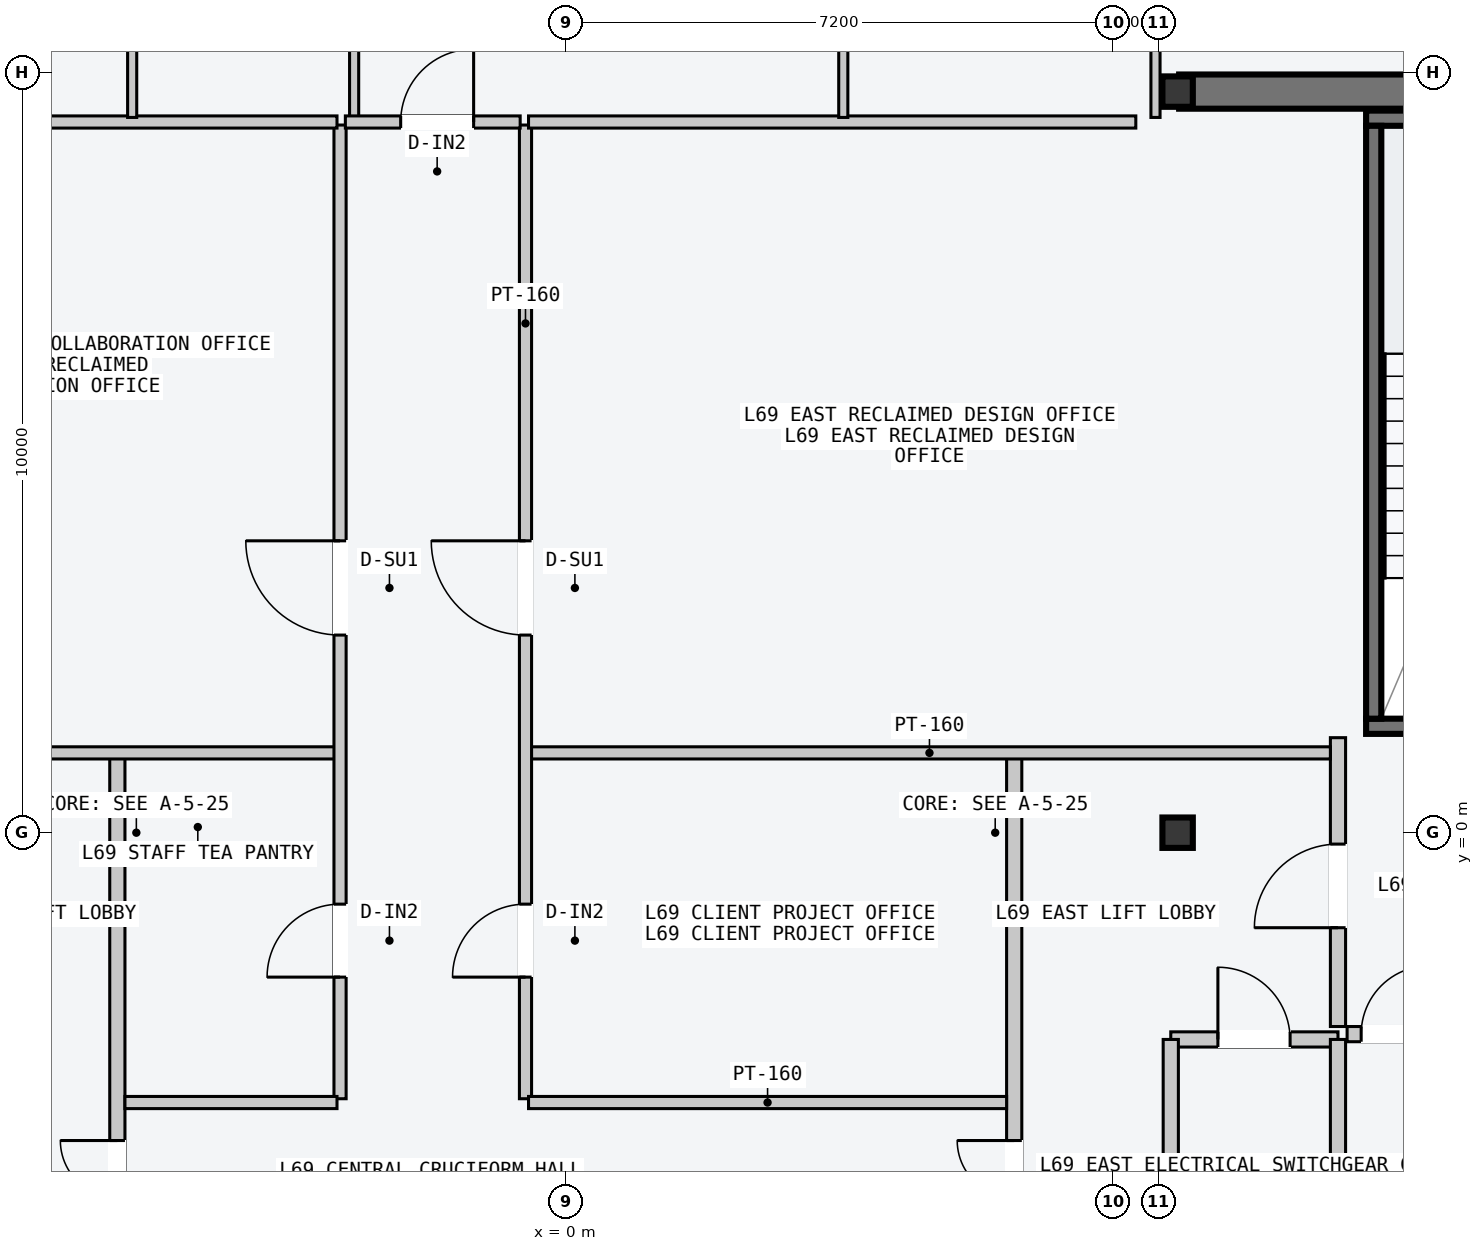
"""IFC4 building model, lengths in metres.
Left out: names, types, materials, properties, quantities, classifications, styles, units other than length and angle.
Written with IfcOpenShell. Run it as: python <this file> out.ifc"""

import sys

from ifc_helpers import new_model, si_unit, direction, frame, frame_2d, origin, origin_2d, place, context, subcontext, project, spatial, rectangle, i_section, extrude, element, fill, save


model = new_model("IFC4")
c1 = context("Model", 3, precision=1e-05, world=origin(), true_north=direction((0.0, 1.0)))
c2 = subcontext(c1, "Body", "Model", "MODEL_VIEW")
j1 = project(units=[si_unit("LENGTHUNIT", "METRE"), si_unit("PLANEANGLEUNIT", "RADIAN")], contexts=[c1])
p1 = place(None, origin())
s1 = spatial("IfcSite", under=j1, at=p1, CompositionType="ELEMENT")
p2 = place(p1, origin())
s2 = spatial("IfcBuilding", under=s1, at=p2, CompositionType="ELEMENT")
p3 = place(p2, frame((0.0, 0.0, 261.6)))
s3 = spatial("IfcBuildingStorey", under=s2, at=p3, CompositionType="ELEMENT", Elevation=261.6)
p4 = place(p3, frame((8.07, 9.75, -0.2), z_axis=(0.0, 0.0, 1.0), x_axis=(1.0, 0.0, 0.0)))
e1 = element("IfcWall", 1, at=p4, inside=s3, PredefinedType="SHEAR", context=c2, shape_type="SweptSolid", body=[
    extrude(rectangle(XDim=6.46, YDim=0.45, at=frame_2d((3.23, 0.0))), origin(), (0.0, 0.0, 1.0), 3.6),
])
p5 = place(p3, frame((10.53, 1.4, -0.2), z_axis=(0.0, 0.0, 1.0), x_axis=(1.0, 0.0, 0.0)))
e2 = element("IfcWall", 2, at=p5, inside=s3, PredefinedType="SOLIDWALL", context=c2, shape_type="SweptSolid", body=[
    extrude(rectangle(XDim=3.72, YDim=0.2, at=frame_2d((1.86, 0.0))), origin(), (0.0, 0.0, 1.0), 3.6),
])
p6 = place(p5, frame((1.5, 0.0, 0.2)))
e3 = element("IfcOpeningElement", 3, at=p6, cuts=e2, PredefinedType="OPENING", context=c2, shape_type="SweptSolid", body=[
    extrude(rectangle(XDim=1.12, YDim=2.18, at=frame_2d((0.56, 1.09))), frame((0.0, 0.11, 0.0), z_axis=(0.0, -1.0, 0.0), x_axis=(1.0, 0.0, 0.0)), (0.0, 0.0, 1.0), 0.22),
])
p7 = place(p3, frame((10.53, 9.4, -0.2), z_axis=(0.0, 0.0, 1.0), x_axis=(1.0, 0.0, 0.0)))
e4 = element("IfcWall", 4, at=p7, inside=s3, PredefinedType="SOLIDWALL", context=c2, shape_type="SweptSolid", body=[
    extrude(rectangle(XDim=3.72, YDim=0.2, at=frame_2d((1.86, 0.0))), origin(), (0.0, 0.0, 1.0), 3.6),
])
p8 = place(p3, frame((10.63, 1.5, -0.2), z_axis=(0.0, 0.0, 1.0), x_axis=(0.0, 1.0, 0.0)))
e5 = element("IfcWall", 5, at=p8, inside=s3, PredefinedType="SOLIDWALL", context=c2, shape_type="SweptSolid", body=[
    extrude(rectangle(XDim=7.8, YDim=0.2, at=frame_2d((3.9, 0.0))), origin(), (0.0, 0.0, 1.0), 3.6),
])
for number, where, z_axis, x_axis in (
    (6, (8.05, 0.0, 0.0), (0.0, 0.0, 1.0), (1.0, 0.0, 0.0)),
    (7, (8.05, 9.75, 0.0), (0.0, 0.0, 1.0), (1.0, 0.0, 0.0)),
):
    element("IfcColumn", number, at=place(p3, frame(where, z_axis=z_axis, x_axis=x_axis)), inside=s3, PredefinedType="COLUMN", context=c2, shape_type="SweptSolid", body=[
        extrude(i_section(OverallWidth=0.4, OverallDepth=0.4, WebThickness=0.013, FlangeThickness=0.021, at=origin_2d()), origin(), (0.0, 0.0, 1.0), 3.6),
    ])
p9 = place(p3, frame((-5.9, -9.45, 0.0), z_axis=(0.0, 0.0, 1.0), x_axis=(0.0, 1.0, 0.0)))
e8 = element("IfcWall", 8, at=p9, inside=s3, PredefinedType="PARTITIONING", context=c2, shape_type="SweptSolid", body=[
    extrude(rectangle(XDim=10.5, YDim=0.2, at=frame_2d((5.25, 0.0))), origin(), (0.0, 0.0, 1.0), 3.4),
])
p10 = place(p9, frame((3.9, 0.0, 0.0)))
e9 = element("IfcOpeningElement", 9, at=p10, cuts=e8, PredefinedType="OPENING", context=c2, shape_type="SweptSolid", body=[
    extrude(rectangle(XDim=1.5, YDim=2.2, at=frame_2d((0.75, 1.1))), frame((0.0, 0.11, 0.0), z_axis=(0.0, -1.0, 0.0), x_axis=(1.0, 0.0, 0.0)), (0.0, 0.0, 1.0), 0.22),
])
p11 = place(p3, frame((5.9, -9.45, 0.0), z_axis=(0.0, 0.0, 1.0), x_axis=(0.0, 1.0, 0.0)))
e10 = element("IfcWall", 10, at=p11, inside=s3, PredefinedType="PARTITIONING", context=c2, shape_type="SweptSolid", body=[
    extrude(rectangle(XDim=10.5, YDim=0.2, at=frame_2d((5.25, 0.0))), origin(), (0.0, 0.0, 1.0), 3.4),
])
p12 = place(p11, frame((3.9, 0.0, 0.0)))
e11 = element("IfcOpeningElement", 11, at=p12, cuts=e10, PredefinedType="OPENING", context=c2, shape_type="SweptSolid", body=[
    extrude(rectangle(XDim=1.5, YDim=2.2, at=frame_2d((0.75, 1.1))), frame((0.0, 0.11, 0.0), z_axis=(0.0, -1.0, 0.0), x_axis=(1.0, 0.0, 0.0)), (0.0, 0.0, 1.0), 0.22),
])
p13 = place(p3, frame((10.16, -2.55, 0.0), z_axis=(0.0, 0.0, 1.0), x_axis=(0.0, 1.0, 0.0)))
e12 = element("IfcWall", 12, at=p13, inside=s3, PredefinedType="PARTITIONING", context=c2, shape_type="SweptSolid", body=[
    extrude(rectangle(XDim=3.8, YDim=0.2, at=frame_2d((1.9, 0.0))), origin(), (0.0, 0.0, 1.0), 3.4),
])
p14 = place(p13, frame((1.3, 0.0, 0.0)))
e13 = element("IfcOpeningElement", 13, at=p14, cuts=e12, PredefinedType="OPENING", context=c2, shape_type="SweptSolid", body=[
    extrude(rectangle(XDim=1.1, YDim=2.15, at=frame_2d((0.55, 1.075))), frame((0.0, 0.11, 0.0), z_axis=(0.0, -1.0, 0.0), x_axis=(1.0, 0.0, 0.0)), (0.0, 0.0, 1.0), 0.22),
])
p15 = place(p3, frame((10.28, -2.65, 0.0), z_axis=(0.0, 0.0, 1.0), x_axis=(1.0, 0.0, 0.0)))
e14 = element("IfcWall", 14, at=p15, inside=s3, PredefinedType="PARTITIONING", context=c2, shape_type="SweptSolid", body=[
    extrude(rectangle(XDim=1.27, YDim=0.2, at=frame_2d((0.635, 0.0))), origin(), (0.0, 0.0, 1.0), 3.4),
])
p16 = place(p15, frame((0.185, 0.0, 0.0)))
e15 = element("IfcOpeningElement", 15, at=p16, cuts=e14, PredefinedType="OPENING", context=c2, shape_type="SweptSolid", body=[
    extrude(rectangle(XDim=0.9, YDim=2.15, at=frame_2d((0.45, 1.075))), frame((0.0, 0.11, 0.0), z_axis=(0.0, -1.0, 0.0), x_axis=(1.0, 0.0, 0.0)), (0.0, 0.0, 1.0), 0.22),
])
p17 = place(p3, frame((7.96, -2.72, 0.0), z_axis=(0.0, 0.0, 1.0), x_axis=(1.0, 0.0, 0.0)))
e16 = element("IfcWall", 16, at=p17, inside=s3, PredefinedType="PARTITIONING", context=c2, shape_type="SweptSolid", body=[
    extrude(rectangle(XDim=2.2, YDim=0.2, at=frame_2d((1.1, 0.0))), origin(), (0.0, 0.0, 1.0), 3.4),
])
p18 = place(p17, frame((0.62, 0.0, 0.0)))
e17 = element("IfcOpeningElement", 17, at=p18, cuts=e16, PredefinedType="OPENING", context=c2, shape_type="SweptSolid", body=[
    extrude(rectangle(XDim=0.95, YDim=2.1, at=frame_2d((0.475, 1.05))), frame((0.0, 0.11, 0.0), z_axis=(0.0, -1.0, 0.0), x_axis=(1.0, 0.0, 0.0)), (0.0, 0.0, 1.0), 0.22),
])
for number, where, z_axis, x_axis in (
    (18, (7.96, -5.16, 0.0), (0.0, 0.0, 1.0), (0.0, 1.0, 0.0)),
    (19, (10.16, -5.16, 0.0), (0.0, 0.0, 1.0), (0.0, 1.0, 0.0)),
):
    element("IfcWall", number, at=place(p3, frame(where, z_axis=z_axis, x_axis=x_axis)), inside=s3, PredefinedType="PARTITIONING", context=c2, shape_type="SweptSolid", body=[
        extrude(rectangle(XDim=2.44, YDim=0.2, at=frame_2d((1.22, 0.0))), origin(), (0.0, 0.0, 1.0), 3.4),
    ])
p19 = place(p3, frame((-10.05, 1.05, 0.0), z_axis=(0.0, 0.0, 1.0), x_axis=(1.0, 0.0, 0.0)))
e20 = element("IfcWall", 20, at=p19, inside=s3, PredefinedType="PARTITIONING", context=c2, shape_type="SweptSolid", body=[
    extrude(rectangle(XDim=7.04, YDim=0.16, at=frame_2d((3.52, 0.0))), origin(), (0.0, 0.0, 1.0), 3.4),
])
p20 = place(p3, frame((-2.97, -3.5, 0.0), z_axis=(0.0, 0.0, 1.0), x_axis=(0.0, 1.0, 0.0)))
e21 = element("IfcWall", 21, at=p20, inside=s3, PredefinedType="PARTITIONING", context=c2, shape_type="SweptSolid", body=[
    extrude(rectangle(XDim=12.81, YDim=0.16, at=frame_2d((6.405, 0.0))), origin(), (0.0, 0.0, 1.0), 3.4),
])
p21 = place(p20, frame((6.1, 0.0, 0.0)))
e22 = element("IfcOpeningElement", 22, at=p21, cuts=e21, PredefinedType="OPENING", context=c2, shape_type="SweptSolid", body=[
    extrude(rectangle(XDim=1.24, YDim=2.24, at=frame_2d((0.62, 1.12))), frame((0.0, 0.09, 0.0), z_axis=(0.0, -1.0, 0.0), x_axis=(1.0, 0.0, 0.0)), (0.0, 0.0, 1.0), 0.18),
])
p22 = place(p20, frame((1.6, 0.0, 0.0)))
e23 = element("IfcOpeningElement", 23, at=p22, cuts=e21, PredefinedType="OPENING", context=c2, shape_type="SweptSolid", body=[
    extrude(rectangle(XDim=0.96, YDim=2.18, at=frame_2d((0.48, 1.09))), frame((0.0, 0.09, 0.0), z_axis=(0.0, -1.0, 0.0), x_axis=(1.0, 0.0, 0.0)), (0.0, 0.0, 1.0), 0.18),
])
p23 = place(p3, frame((-7.5, 9.35, 0.0), z_axis=(0.0, 0.0, 1.0), x_axis=(1.0, 0.0, 0.0)))
e24 = element("IfcWall", 24, at=p23, inside=s3, PredefinedType="PARTITIONING", context=c2, shape_type="SweptSolid", body=[
    extrude(rectangle(XDim=4.49, YDim=0.16, at=frame_2d((2.245, 0.0))), origin(), (0.0, 0.0, 1.0), 3.4),
])
p24 = place(p3, frame((-5.8, -3.55, 0.0), z_axis=(0.0, 0.0, 1.0), x_axis=(1.0, 0.0, 0.0)))
e25 = element("IfcWall", 25, at=p24, inside=s3, PredefinedType="PARTITIONING", context=c2, shape_type="SweptSolid", body=[
    extrude(rectangle(XDim=2.79, YDim=0.16, at=frame_2d((1.395, 0.0))), origin(), (0.0, 0.0, 1.0), 3.4),
])
p25 = place(p3, frame((-0.49, 1.05, 0.0), z_axis=(0.0, 0.0, 1.0), x_axis=(1.0, 0.0, 0.0)))
e26 = element("IfcWall", 26, at=p25, inside=s3, PredefinedType="PARTITIONING", context=c2, shape_type="SweptSolid", body=[
    extrude(rectangle(XDim=10.55, YDim=0.16, at=frame_2d((5.275, 0.0))), origin(), (0.0, 0.0, 1.0), 3.4),
])
p26 = place(p3, frame((-0.53, -3.5, 0.0), z_axis=(0.0, 0.0, 1.0), x_axis=(0.0, 1.0, 0.0)))
e27 = element("IfcWall", 27, at=p26, inside=s3, PredefinedType="PARTITIONING", context=c2, shape_type="SweptSolid", body=[
    extrude(rectangle(XDim=12.81, YDim=0.16, at=frame_2d((6.405, 0.0))), origin(), (0.0, 0.0, 1.0), 3.4),
])
p27 = place(p26, frame((6.1, 0.0, 0.0)))
e28 = element("IfcOpeningElement", 28, at=p27, cuts=e27, PredefinedType="OPENING", context=c2, shape_type="SweptSolid", body=[
    extrude(rectangle(XDim=1.24, YDim=2.24, at=frame_2d((0.62, 1.12))), frame((0.0, 0.09, 0.0), z_axis=(0.0, -1.0, 0.0), x_axis=(1.0, 0.0, 0.0)), (0.0, 0.0, 1.0), 0.18),
])
p28 = place(p26, frame((1.6, 0.0, 0.0)))
e29 = element("IfcOpeningElement", 29, at=p28, cuts=e27, PredefinedType="OPENING", context=c2, shape_type="SweptSolid", body=[
    extrude(rectangle(XDim=0.96, YDim=2.18, at=frame_2d((0.48, 1.09))), frame((0.0, 0.09, 0.0), z_axis=(0.0, -1.0, 0.0), x_axis=(1.0, 0.0, 0.0)), (0.0, 0.0, 1.0), 0.18),
])
p29 = place(p3, frame((-0.49, 9.35, 0.0), z_axis=(0.0, 0.0, 1.0), x_axis=(1.0, 0.0, 0.0)))
e30 = element("IfcWall", 30, at=p29, inside=s3, PredefinedType="PARTITIONING", context=c2, shape_type="SweptSolid", body=[
    extrude(rectangle(XDim=7.99, YDim=0.16, at=frame_2d((3.995, 0.0))), origin(), (0.0, 0.0, 1.0), 3.4),
])
p30 = place(p3, frame((-0.49, -3.55, 0.0), z_axis=(0.0, 0.0, 1.0), x_axis=(1.0, 0.0, 0.0)))
e31 = element("IfcWall", 31, at=p30, inside=s3, PredefinedType="PARTITIONING", context=c2, shape_type="SweptSolid", body=[
    extrude(rectangle(XDim=6.29, YDim=0.16, at=frame_2d((3.145, 0.0))), origin(), (0.0, 0.0, 1.0), 3.4),
])
p31 = place(p3, frame((-5.705, 9.41, 0.0), z_axis=(0.0, 0.0, 1.0), x_axis=(0.0, 1.0, 0.0)))
e32 = element("IfcWall", 32, at=p31, inside=s3, PredefinedType="PARTITIONING", context=c2, shape_type="SweptSolid", body=[
    extrude(rectangle(XDim=8.15, YDim=0.12, at=frame_2d((4.075, 0.0))), origin(), (0.0, 0.0, 1.0), 3.4),
])
p32 = place(p31, frame((1.15, 0.0, 0.0)))
e33 = element("IfcOpeningElement", 33, at=p32, cuts=e32, PredefinedType="OPENING", context=c2, shape_type="SweptSolid", body=[
    extrude(rectangle(XDim=0.96, YDim=2.18, at=frame_2d((0.48, 1.09))), frame((0.0, 0.07, 0.0), z_axis=(0.0, -1.0, 0.0), x_axis=(1.0, 0.0, 0.0)), (0.0, 0.0, 1.0), 0.14),
])
p33 = place(p3, frame((-2.785, 9.41, 0.0), z_axis=(0.0, 0.0, 1.0), x_axis=(0.0, 1.0, 0.0)))
e34 = element("IfcWall", 34, at=p33, inside=s3, PredefinedType="PARTITIONING", context=c2, shape_type="SweptSolid", body=[
    extrude(rectangle(XDim=8.15, YDim=0.12, at=frame_2d((4.075, 0.0))), origin(), (0.0, 0.0, 1.0), 3.4),
])
p34 = place(p33, frame((1.15, 0.0, 0.0)))
e35 = element("IfcOpeningElement", 35, at=p34, cuts=e34, PredefinedType="OPENING", context=c2, shape_type="SweptSolid", body=[
    extrude(rectangle(XDim=0.96, YDim=2.18, at=frame_2d((0.48, 1.09))), frame((0.0, 0.07, 0.0), z_axis=(0.0, -1.0, 0.0), x_axis=(1.0, 0.0, 0.0)), (0.0, 0.0, 1.0), 0.14),
])
p35 = place(p3, frame((3.651, 9.41, 0.0), z_axis=(0.0, 0.0, 1.0), x_axis=(0.0, 1.0, 0.0)))
e36 = element("IfcWall", 36, at=p35, inside=s3, PredefinedType="PARTITIONING", context=c2, shape_type="SweptSolid", body=[
    extrude(rectangle(XDim=8.15, YDim=0.12, at=frame_2d((4.075, 0.0))), origin(), (0.0, 0.0, 1.0), 3.4),
])
p36 = place(p35, frame((1.15, 0.0, 0.0)))
e37 = element("IfcOpeningElement", 37, at=p36, cuts=e36, PredefinedType="OPENING", context=c2, shape_type="SweptSolid", body=[
    extrude(rectangle(XDim=0.96, YDim=2.18, at=frame_2d((0.48, 1.09))), frame((0.0, 0.07, 0.0), z_axis=(0.0, -1.0, 0.0), x_axis=(1.0, 0.0, 0.0)), (0.0, 0.0, 1.0), 0.14),
])
p37 = place(p3, frame((7.759, 9.41, 0.0), z_axis=(0.0, 0.0, 1.0), x_axis=(0.0, 1.0, 0.0)))
e38 = element("IfcWall", 38, at=p37, inside=s3, PredefinedType="PARTITIONING", context=c2, shape_type="SweptSolid", body=[
    extrude(rectangle(XDim=8.15, YDim=0.12, at=frame_2d((4.075, 0.0))), origin(), (0.0, 0.0, 1.0), 3.4),
])
p38 = place(p37, frame((1.66, 0.0, 0.0)))
e39 = element("IfcOpeningElement", 39, at=p38, cuts=e38, PredefinedType="OPENING", context=c2, shape_type="SweptSolid", body=[
    extrude(rectangle(XDim=0.96, YDim=2.18, at=frame_2d((0.48, 1.09))), frame((0.0, 0.07, 0.0), z_axis=(0.0, -1.0, 0.0), x_axis=(1.0, 0.0, 0.0)), (0.0, 0.0, 1.0), 0.14),
])
p39 = place(p3, frame((-2.9, 9.35, 0.0), z_axis=(0.0, 0.0, 1.0), x_axis=(1.0, 0.0, 0.0)))
e40 = element("IfcWall", 40, at=p39, inside=s3, PredefinedType="PARTITIONING", context=c2, shape_type="SweptSolid", body=[
    extrude(rectangle(XDim=2.3, YDim=0.16, at=frame_2d((1.15, 0.0))), origin(), (0.0, 0.0, 1.0), 3.4),
])
p40 = place(p39, frame((0.728, 0.0, 0.0)))
e41 = element("IfcOpeningElement", 41, at=p40, cuts=e40, PredefinedType="OPENING", context=c2, shape_type="SweptSolid", body=[
    extrude(rectangle(XDim=0.96, YDim=2.18, at=frame_2d((0.48, 1.09))), frame((0.0, 0.09, 0.0), z_axis=(0.0, -1.0, 0.0), x_axis=(1.0, 0.0, 0.0)), (0.0, 0.0, 1.0), 0.18),
])
p41 = place(p10, origin())
e42 = element("IfcDoor", 42, at=p41, inside=s3, OperationType="DOUBLE_DOOR_SINGLE_SWING", PredefinedType="DOOR", context=c2, shape_type="SweptSolid", body=[
    extrude(rectangle(XDim=1.5, YDim=2.2, at=frame_2d((0.75, 1.1))), frame((0.0, 0.025, 0.0), z_axis=(0.0, -1.0, 0.0), x_axis=(1.0, 0.0, 0.0)), (0.0, 0.0, 1.0), 0.05),
])
fill(e9, e42)
p42 = place(p12, origin())
e43 = element("IfcDoor", 43, at=p42, inside=s3, OperationType="DOUBLE_DOOR_SINGLE_SWING", PredefinedType="DOOR", context=c2, shape_type="SweptSolid", body=[
    extrude(rectangle(XDim=1.5, YDim=2.2, at=frame_2d((0.75, 1.1))), frame((0.0, 0.025, 0.0), z_axis=(0.0, -1.0, 0.0), x_axis=(1.0, 0.0, 0.0)), (0.0, 0.0, 1.0), 0.05),
])
fill(e11, e43)
p43 = place(p14, origin())
e44 = element("IfcDoor", 44, at=p43, inside=s3, OperationType="SINGLE_SWING_LEFT", PredefinedType="DOOR", context=c2, shape_type="SweptSolid", body=[
    extrude(rectangle(XDim=1.1, YDim=2.15, at=frame_2d((0.55, 1.075))), frame((0.0, 0.025, 0.0), z_axis=(0.0, -1.0, 0.0), x_axis=(1.0, 0.0, 0.0)), (0.0, 0.0, 1.0), 0.05),
])
fill(e13, e44)
p44 = place(p16, origin())
e45 = element("IfcDoor", 45, at=p44, inside=s3, OperationType="SINGLE_SWING_RIGHT", PredefinedType="DOOR", context=c2, shape_type="SweptSolid", body=[
    extrude(rectangle(XDim=0.9, YDim=2.15, at=frame_2d((0.45, 1.075))), frame((0.0, 0.025, 0.0), z_axis=(0.0, -1.0, 0.0), x_axis=(1.0, 0.0, 0.0)), (0.0, 0.0, 1.0), 0.05),
])
fill(e15, e45)
p45 = place(p18, origin())
e46 = element("IfcDoor", 46, at=p45, inside=s3, OperationType="SINGLE_SWING_LEFT", PredefinedType="DOOR", context=c2, shape_type="SweptSolid", body=[
    extrude(rectangle(XDim=0.95, YDim=2.1, at=frame_2d((0.475, 1.05))), frame((0.0, 0.025, 0.0), z_axis=(0.0, -1.0, 0.0), x_axis=(1.0, 0.0, 0.0)), (0.0, 0.0, 1.0), 0.05),
])
fill(e17, e46)
p46 = place(p21, origin())
e47 = element("IfcDoor", 47, at=p46, inside=s3, OperationType="SINGLE_SWING_RIGHT", PredefinedType="DOOR", context=c2, shape_type="SweptSolid", body=[
    extrude(rectangle(XDim=1.24, YDim=2.24, at=frame_2d((0.62, 1.12))), frame((0.0, 0.025, 0.0), z_axis=(0.0, -1.0, 0.0), x_axis=(1.0, 0.0, 0.0)), (0.0, 0.0, 1.0), 0.05),
])
fill(e22, e47)
p47 = place(p22, origin())
e48 = element("IfcDoor", 48, at=p47, inside=s3, OperationType="SINGLE_SWING_LEFT", PredefinedType="DOOR", context=c2, shape_type="SweptSolid", body=[
    extrude(rectangle(XDim=0.96, YDim=2.18, at=frame_2d((0.48, 1.09))), frame((0.0, 0.025, 0.0), z_axis=(0.0, -1.0, 0.0), x_axis=(1.0, 0.0, 0.0)), (0.0, 0.0, 1.0), 0.05),
])
fill(e23, e48)
p48 = place(p27, origin())
e49 = element("IfcDoor", 49, at=p48, inside=s3, OperationType="SINGLE_SWING_RIGHT", PredefinedType="DOOR", context=c2, shape_type="SweptSolid", body=[
    extrude(rectangle(XDim=1.24, YDim=2.24, at=frame_2d((0.62, 1.12))), frame((0.0, 0.025, 0.0), z_axis=(0.0, -1.0, 0.0), x_axis=(1.0, 0.0, 0.0)), (0.0, 0.0, 1.0), 0.05),
])
fill(e28, e49)
p49 = place(p28, origin())
e50 = element("IfcDoor", 50, at=p49, inside=s3, OperationType="SINGLE_SWING_LEFT", PredefinedType="DOOR", context=c2, shape_type="SweptSolid", body=[
    extrude(rectangle(XDim=0.96, YDim=2.18, at=frame_2d((0.48, 1.09))), frame((0.0, 0.025, 0.0), z_axis=(0.0, -1.0, 0.0), x_axis=(1.0, 0.0, 0.0)), (0.0, 0.0, 1.0), 0.05),
])
fill(e29, e50)
p50 = place(p40, origin())
e51 = element("IfcDoor", 51, at=p50, inside=s3, OperationType="SINGLE_SWING_RIGHT", PredefinedType="DOOR", context=c2, shape_type="SweptSolid", body=[
    extrude(rectangle(XDim=0.96, YDim=2.18, at=frame_2d((0.48, 1.09))), frame((0.0, 0.025, 0.0), z_axis=(0.0, -1.0, 0.0), x_axis=(1.0, 0.0, 0.0)), (0.0, 0.0, 1.0), 0.05),
])
fill(e41, e51)
save(model, sys.argv[1])
